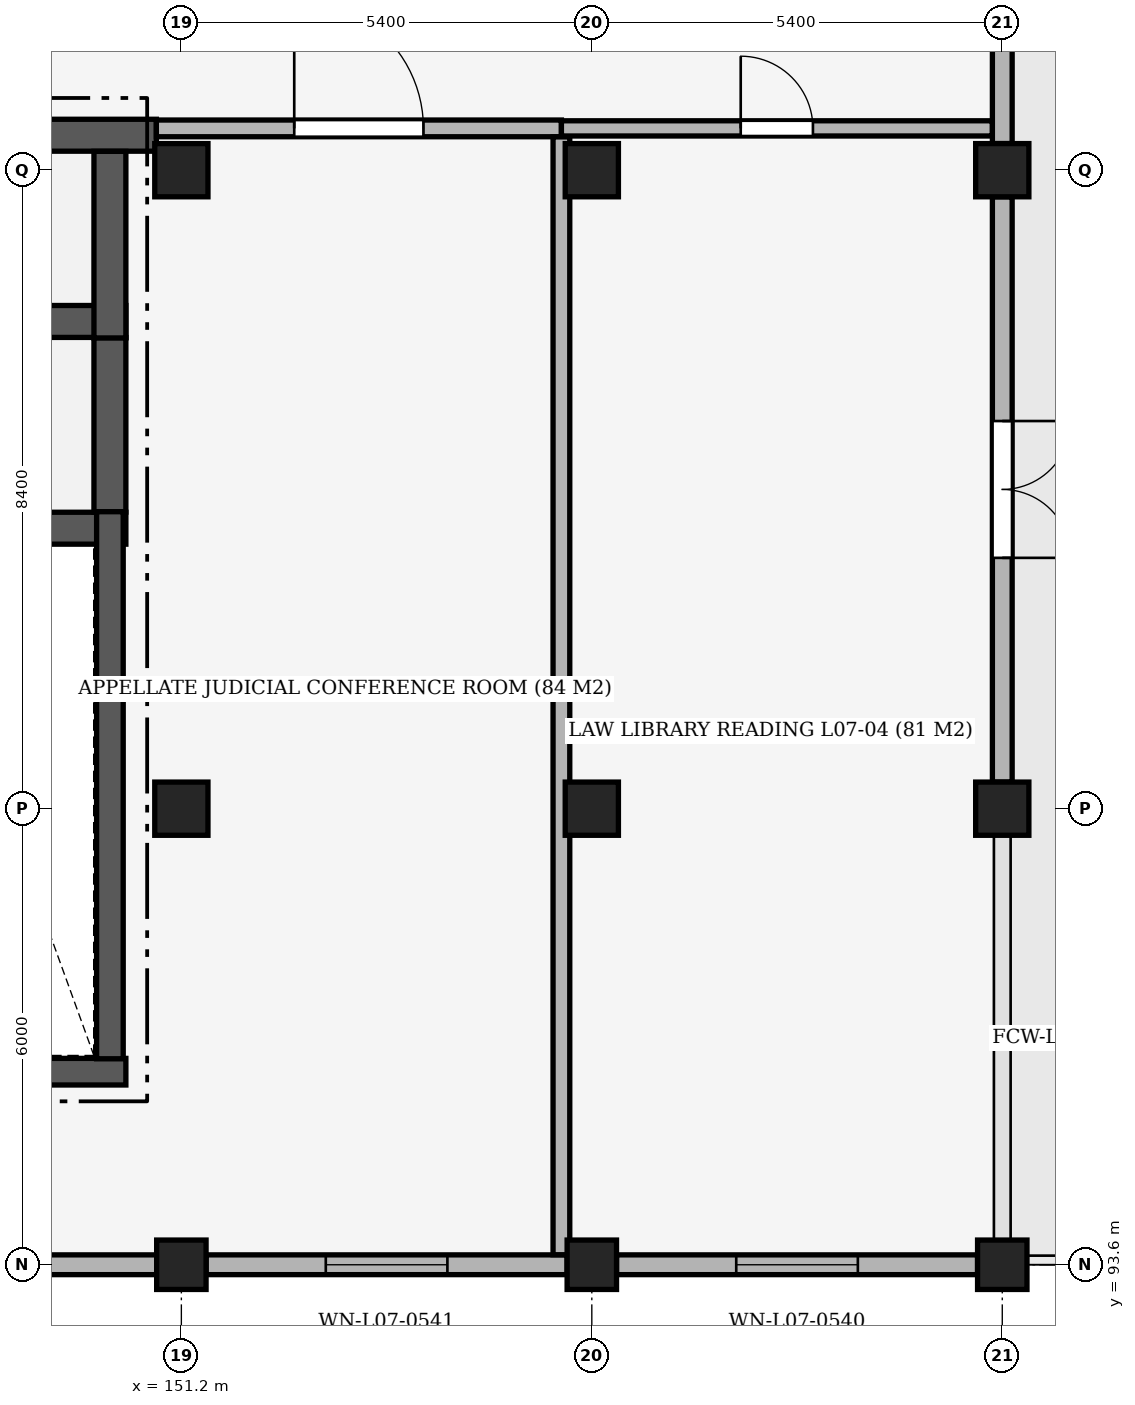
"""IFC4 building model, lengths in metres.
Left out: names, types, materials, properties, quantities, classifications, styles, units other than length and angle.
Written with IfcOpenShell. Run it as: python <this file> out.ifc"""

import sys

from ifc_helpers import new_model, si_unit, direction, frame, frame_2d, origin, origin_2d, place, context, subcontext, project, spatial, rectangle, extrude, element, fill, save


model = new_model("IFC4")
c1 = context("Model", 3, precision=1e-05, world=origin(), true_north=direction((0.0, 1.0)))
c2 = subcontext(c1, "Body", "Model", "MODEL_VIEW")
j1 = project(units=[si_unit("LENGTHUNIT", "METRE"), si_unit("PLANEANGLEUNIT", "RADIAN")], contexts=[c1])
p1 = place(None, origin())
s1 = spatial("IfcSite", under=j1, at=p1, CompositionType="ELEMENT")
p2 = place(p1, origin())
s2 = spatial("IfcBuilding", under=s1, at=p2, CompositionType="ELEMENT")
p3 = place(p2, frame((0.0, 0.0, 33.6)))
s3 = spatial("IfcBuildingStorey", under=s2, at=p3, CompositionType="ELEMENT", Elevation=33.6)
p4 = place(p3, frame((151.2, 93.6, 0.0), z_axis=(0.0, 0.0, 1.0), x_axis=(1.0, 0.0, 0.0)))
e1 = element("IfcColumn", 1, at=p4, inside=s3, PredefinedType="COLUMN", context=c2, shape_type="SweptSolid", body=[
    extrude(rectangle(XDim=0.65, YDim=0.65, at=origin_2d()), origin(), (0.0, 0.0, 1.0), 4.2),
])
for number, where, z_axis, x_axis in (
    (2, (151.2, 99.6, 0.0), (0.0, 0.0, 1.0), (1.0, 0.0, 0.0)),
    (3, (151.2, 108.0, 0.0), (0.0, 0.0, 1.0), (1.0, 0.0, 0.0)),
):
    element("IfcColumn", number, at=place(p3, frame(where, z_axis=z_axis, x_axis=x_axis)), inside=s3, PredefinedType="COLUMN", context=c2, shape_type="SweptSolid", body=[
        extrude(rectangle(XDim=0.7, YDim=0.7, at=origin_2d()), origin(), (0.0, 0.0, 1.0), 4.2),
    ])
p5 = place(p3, frame((156.6, 93.6, 0.0), z_axis=(0.0, 0.0, 1.0), x_axis=(1.0, 0.0, 0.0)))
e4 = element("IfcColumn", 4, at=p5, inside=s3, PredefinedType="COLUMN", context=c2, shape_type="SweptSolid", body=[
    extrude(rectangle(XDim=0.65, YDim=0.65, at=origin_2d()), origin(), (0.0, 0.0, 1.0), 4.2),
])
for number, where, z_axis, x_axis in (
    (5, (156.6, 99.6, 0.0), (0.0, 0.0, 1.0), (1.0, 0.0, 0.0)),
    (6, (156.6, 108.0, 0.0), (0.0, 0.0, 1.0), (1.0, 0.0, 0.0)),
):
    element("IfcColumn", number, at=place(p3, frame(where, z_axis=z_axis, x_axis=x_axis)), inside=s3, PredefinedType="COLUMN", context=c2, shape_type="SweptSolid", body=[
        extrude(rectangle(XDim=0.7, YDim=0.7, at=origin_2d()), origin(), (0.0, 0.0, 1.0), 4.2),
    ])
p6 = place(p3, frame((162.0, 93.6, 0.0), z_axis=(0.0, 0.0, 1.0), x_axis=(1.0, 0.0, 0.0)))
e7 = element("IfcColumn", 7, at=p6, inside=s3, PredefinedType="COLUMN", context=c2, shape_type="SweptSolid", body=[
    extrude(rectangle(XDim=0.65, YDim=0.65, at=origin_2d()), origin(), (0.0, 0.0, 1.0), 4.2),
])
for number, where, z_axis, x_axis in (
    (8, (162.0, 99.6, 0.0), (0.0, 0.0, 1.0), (1.0, 0.0, 0.0)),
    (9, (162.0, 108.0, 0.0), (0.0, 0.0, 1.0), (1.0, 0.0, 0.0)),
):
    element("IfcColumn", number, at=place(p3, frame(where, z_axis=z_axis, x_axis=x_axis)), inside=s3, PredefinedType="COLUMN", context=c2, shape_type="SweptSolid", body=[
        extrude(rectangle(XDim=0.7, YDim=0.7, at=origin_2d()), origin(), (0.0, 0.0, 1.0), 4.2),
    ])
p7 = place(p3, frame((162.0, 113.05, 0.0), z_axis=(0.0, 0.0, 1.0), x_axis=(0.0, -1.0, 0.0)))
e10 = element("IfcWall", 10, at=p7, inside=s3, PredefinedType="SOLIDWALL", context=c2, shape_type="SweptSolid", body=[
    extrude(rectangle(XDim=4.7, YDim=0.26, at=frame_2d((2.35, 0.0))), origin(), (0.0, 0.0, 1.0), 3.4),
])
p8 = place(p3, frame((162.0, 107.65, 0.0), z_axis=(0.0, 0.0, 1.0), x_axis=(0.0, -1.0, 0.0)))
e11 = element("IfcWall", 11, at=p8, inside=s3, PredefinedType="SOLIDWALL", context=c2, shape_type="SweptSolid", body=[
    extrude(rectangle(XDim=7.7, YDim=0.26, at=frame_2d((3.85, 0.0))), origin(), (0.0, 0.0, 1.0), 3.25),
])
p9 = place(p8, frame((2.95, 0.0, 0.0)))
e12 = element("IfcOpeningElement", 12, at=p9, cuts=e11, PredefinedType="OPENING", context=c2, shape_type="SweptSolid", body=[
    extrude(rectangle(XDim=1.8, YDim=2.2, at=frame_2d((0.9, 1.1))), frame((0.0, 0.145, 0.0), z_axis=(0.0, -1.0, 0.0), x_axis=(1.0, 0.0, 0.0)), (0.0, 0.0, 1.0), 0.29),
])
p10 = place(p3, frame((161.675, 93.6, 0.0), z_axis=(0.0, 0.0, 1.0), x_axis=(-1.0, 0.0, 0.0)))
e13 = element("IfcWall", 13, at=p10, inside=s3, PredefinedType="SOLIDWALL", context=c2, shape_type="SweptSolid", body=[
    extrude(rectangle(XDim=4.75, YDim=0.26, at=frame_2d((2.375, 0.0))), origin(), (0.0, 0.0, 1.0), 3.35),
])
p11 = place(p10, frame((1.575, 0.0, 1.05)))
e14 = element("IfcOpeningElement", 14, at=p11, cuts=e13, PredefinedType="OPENING", context=c2, shape_type="SweptSolid", body=[
    extrude(rectangle(XDim=1.6, YDim=1.8, at=frame_2d((0.8, 0.9))), frame((0.0, 0.145, 0.0), z_axis=(0.0, -1.0, 0.0), x_axis=(1.0, 0.0, 0.0)), (0.0, 0.0, 1.0), 0.29),
])
p12 = place(p3, frame((156.275, 93.6, 0.0), z_axis=(0.0, 0.0, 1.0), x_axis=(-1.0, 0.0, 0.0)))
e15 = element("IfcWall", 15, at=p12, inside=s3, PredefinedType="SOLIDWALL", context=c2, shape_type="SweptSolid", body=[
    extrude(rectangle(XDim=4.75, YDim=0.26, at=frame_2d((2.375, 0.0))), origin(), (0.0, 0.0, 1.0), 3.35),
])
p13 = place(p12, frame((1.575, 0.0, 1.05)))
e16 = element("IfcOpeningElement", 16, at=p13, cuts=e15, PredefinedType="OPENING", context=c2, shape_type="SweptSolid", body=[
    extrude(rectangle(XDim=1.6, YDim=1.8, at=frame_2d((0.8, 0.9))), frame((0.0, 0.145, 0.0), z_axis=(0.0, -1.0, 0.0), x_axis=(1.0, 0.0, 0.0)), (0.0, 0.0, 1.0), 0.29),
])
p14 = place(p3, frame((150.875, 93.6, 0.0), z_axis=(0.0, 0.0, 1.0), x_axis=(-1.0, 0.0, 0.0)))
e17 = element("IfcWall", 17, at=p14, inside=s3, PredefinedType="SOLIDWALL", context=c2, shape_type="SweptSolid", body=[
    extrude(rectangle(XDim=7.75, YDim=0.26, at=frame_2d((3.875, 0.0))), origin(), (0.0, 0.0, 1.0), 3.25),
])
p15 = place(p14, frame((1.517, 0.0, 1.05)))
e18 = element("IfcOpeningElement", 18, at=p15, cuts=e17, PredefinedType="OPENING", context=c2, shape_type="SweptSolid", body=[
    extrude(rectangle(XDim=1.6, YDim=1.8, at=frame_2d((0.8, 0.9))), frame((0.0, 0.145, 0.0), z_axis=(0.0, -1.0, 0.0), x_axis=(1.0, 0.0, 0.0)), (0.0, 0.0, 1.0), 0.29),
])
p16 = place(p14, frame((4.633, 0.0, 1.05)))
e19 = element("IfcOpeningElement", 19, at=p16, cuts=e17, PredefinedType="OPENING", context=c2, shape_type="SweptSolid", body=[
    extrude(rectangle(XDim=1.6, YDim=1.8, at=frame_2d((0.8, 0.9))), frame((0.0, 0.145, 0.0), z_axis=(0.0, -1.0, 0.0), x_axis=(1.0, 0.0, 0.0)), (0.0, 0.0, 1.0), 0.29),
])
p17 = place(p3, frame((147.573, 103.29, 0.0), z_axis=(0.0, 0.0, 1.0), x_axis=(1.0, 0.0, 0.0)))
e20 = element("IfcWall", 20, at=p17, inside=s3, PredefinedType="SHEAR", context=c2, shape_type="SweptSolid", body=[
    extrude(rectangle(XDim=2.897, YDim=0.42, at=frame_2d((1.448, 0.0))), origin(), (0.0, 0.0, 1.0), 3.95),
])
p18 = place(p3, frame((147.13, 106.01, 0.0), z_axis=(0.0, 0.0, 1.0), x_axis=(1.0, 0.0, 0.0)))
e21 = element("IfcWall", 21, at=p18, inside=s3, PredefinedType="SHEAR", context=c2, shape_type="SweptSolid", body=[
    extrude(rectangle(XDim=3.34, YDim=0.42, at=frame_2d((1.67, 0.0))), origin(), (0.0, 0.0, 1.0), 3.95),
])
p19 = place(p3, frame((150.26, 103.502, 0.0), z_axis=(0.0, 0.0, 1.0), x_axis=(0.0, 1.0, 0.0)))
e22 = element("IfcWall", 22, at=p19, inside=s3, PredefinedType="SHEAR", context=c2, shape_type="SweptSolid", body=[
    extrude(rectangle(XDim=2.296, YDim=0.42, at=frame_2d((1.148, 0.0))), origin(), (0.0, 0.0, 1.0), 3.95),
])
p20 = place(p3, frame((147.13, 108.46, 0.0), z_axis=(0.0, 0.0, 1.0), x_axis=(1.0, 0.0, 0.0)))
e23 = element("IfcWall", 23, at=p20, inside=s3, PredefinedType="SHEAR", context=c2, shape_type="SweptSolid", body=[
    extrude(rectangle(XDim=3.741, YDim=0.42, at=frame_2d((1.871, 0.0))), origin(), (0.0, 0.0, 1.0), 3.95),
])
p21 = place(p3, frame((150.26, 105.793, 0.0), z_axis=(0.0, 0.0, 1.0), x_axis=(0.0, 1.0, 0.0)))
e24 = element("IfcWall", 24, at=p21, inside=s3, PredefinedType="SHEAR", context=c2, shape_type="SweptSolid", body=[
    extrude(rectangle(XDim=2.455, YDim=0.42, at=frame_2d((1.228, 0.0))), origin(), (0.0, 0.0, 1.0), 3.95),
])
p22 = place(p3, frame((147.62, 96.14, 0.0), z_axis=(0.0, 0.0, 1.0), x_axis=(1.0, 0.0, 0.0)))
e25 = element("IfcWall", 25, at=p22, inside=s3, PredefinedType="SHEAR", context=c2, shape_type="SweptSolid", body=[
    extrude(rectangle(XDim=2.85, YDim=0.35, at=frame_2d((1.425, 0.0))), origin(), (0.0, 0.0, 1.0), 3.95),
])
p23 = place(p3, frame((150.26, 96.31, 0.0), z_axis=(0.0, 0.0, 1.0), x_axis=(0.0, 1.0, 0.0)))
e26 = element("IfcWall", 26, at=p23, inside=s3, PredefinedType="SHEAR", context=c2, shape_type="SweptSolid", body=[
    extrude(rectangle(XDim=7.197, YDim=0.35, at=frame_2d((3.599, 0.0))), origin(), (0.0, 0.0, 1.0), 3.95),
])
p24 = place(p3, frame((150.871, 108.55, 0.0), z_axis=(0.0, 0.0, 1.0), x_axis=(1.0, 0.0, 0.0)))
e27 = element("IfcWall", 27, at=p24, inside=s3, PredefinedType="PARTITIONING", context=c2, shape_type="SweptSolid", body=[
    extrude(rectangle(XDim=5.329, YDim=0.22, at=frame_2d((2.665, 0.0))), origin(), (0.0, 0.0, 1.0), 3.4),
])
p25 = place(p24, frame((1.814, 0.0, 0.0)))
e28 = element("IfcOpeningElement", 28, at=p25, cuts=e27, PredefinedType="OPENING", context=c2, shape_type="SweptSolid", body=[
    extrude(rectangle(XDim=1.7, YDim=2.35, at=frame_2d((0.85, 1.175))), frame((0.0, 0.125, 0.0), z_axis=(0.0, -1.0, 0.0), x_axis=(1.0, 0.0, 0.0)), (0.0, 0.0, 1.0), 0.25),
])
p26 = place(p3, frame((156.2, 108.55, 0.0), z_axis=(0.0, 0.0, 1.0), x_axis=(1.0, 0.0, 0.0)))
e29 = element("IfcWall", 29, at=p26, inside=s3, PredefinedType="PARTITIONING", context=c2, shape_type="SweptSolid", body=[
    extrude(rectangle(XDim=5.668, YDim=0.2, at=frame_2d((2.834, 0.0))), origin(), (0.0, 0.0, 1.0), 3.4),
])
p27 = place(p26, frame((2.359, 0.0, 0.0)))
e30 = element("IfcOpeningElement", 30, at=p27, cuts=e29, PredefinedType="OPENING", context=c2, shape_type="SweptSolid", body=[
    extrude(rectangle(XDim=0.95, YDim=2.2, at=frame_2d((0.475, 1.1))), frame((0.0, 0.115, 0.0), z_axis=(0.0, -1.0, 0.0), x_axis=(1.0, 0.0, 0.0)), (0.0, 0.0, 1.0), 0.23),
])
p28 = place(p3, frame((156.2, 93.732, 0.0), z_axis=(0.0, 0.0, 1.0), x_axis=(0.0, 1.0, 0.0)))
e31 = element("IfcWall", 31, at=p28, inside=s3, PredefinedType="PARTITIONING", context=c2, shape_type="SweptSolid", body=[
    extrude(rectangle(XDim=14.706, YDim=0.22, at=frame_2d((7.353, 0.0))), origin(), (0.0, 0.0, 1.0), 3.35),
])
p29 = place(p9, origin())
e32 = element("IfcDoor", 32, at=p29, inside=s3, OperationType="DOUBLE_DOOR_SINGLE_SWING", PredefinedType="DOOR", context=c2, shape_type="SweptSolid", body=[
    extrude(rectangle(XDim=1.8, YDim=2.2, at=frame_2d((0.9, 1.1))), frame((0.0, 0.025, 0.0), z_axis=(0.0, -1.0, 0.0), x_axis=(1.0, 0.0, 0.0)), (0.0, 0.0, 1.0), 0.05),
])
fill(e12, e32)
p30 = place(p11, origin())
e33 = element("IfcWindow", 33, at=p30, inside=s3, PartitioningType="SINGLE_PANEL", PredefinedType="WINDOW", context=c2, shape_type="SweptSolid", body=[
    extrude(rectangle(XDim=1.6, YDim=1.8, at=frame_2d((0.8, 0.9))), frame((0.0, 0.03, 0.0), z_axis=(0.0, -1.0, 0.0), x_axis=(1.0, 0.0, 0.0)), (0.0, 0.0, 1.0), 0.06),
])
fill(e14, e33)
p31 = place(p13, origin())
e34 = element("IfcWindow", 34, at=p31, inside=s3, PartitioningType="SINGLE_PANEL", PredefinedType="WINDOW", context=c2, shape_type="SweptSolid", body=[
    extrude(rectangle(XDim=1.6, YDim=1.8, at=frame_2d((0.8, 0.9))), frame((0.0, 0.03, 0.0), z_axis=(0.0, -1.0, 0.0), x_axis=(1.0, 0.0, 0.0)), (0.0, 0.0, 1.0), 0.06),
])
fill(e16, e34)
p32 = place(p25, origin())
e35 = element("IfcDoor", 35, at=p32, inside=s3, OperationType="SINGLE_SWING_LEFT", PredefinedType="DOOR", context=c2, shape_type="SweptSolid", body=[
    extrude(rectangle(XDim=1.7, YDim=2.35, at=frame_2d((0.85, 1.175))), frame((0.0, 0.025, 0.0), z_axis=(0.0, -1.0, 0.0), x_axis=(1.0, 0.0, 0.0)), (0.0, 0.0, 1.0), 0.05),
])
fill(e28, e35)
p33 = place(p27, origin())
e36 = element("IfcDoor", 36, at=p33, inside=s3, OperationType="SINGLE_SWING_LEFT", PredefinedType="DOOR", context=c2, shape_type="SweptSolid", body=[
    extrude(rectangle(XDim=0.95, YDim=2.2, at=frame_2d((0.475, 1.1))), frame((0.0, 0.025, 0.0), z_axis=(0.0, -1.0, 0.0), x_axis=(1.0, 0.0, 0.0)), (0.0, 0.0, 1.0), 0.05),
])
fill(e30, e36)
save(model, sys.argv[1])
